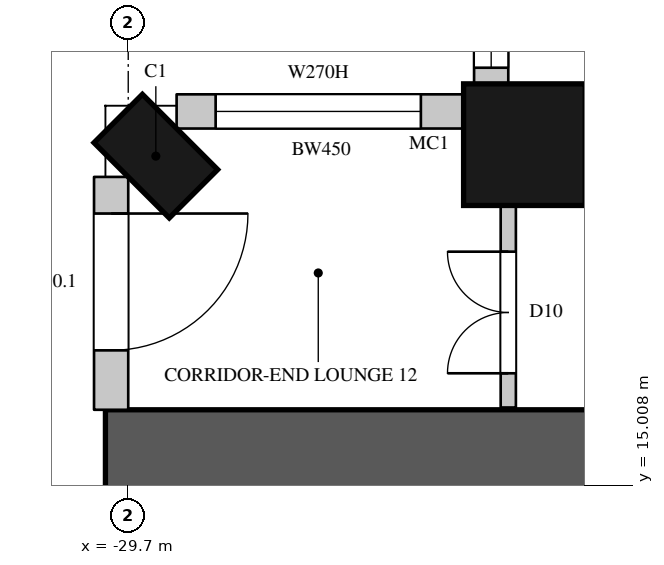
"""IFC4 building model, lengths in metres.
Left out: names, types, materials, properties, quantities, classifications, styles, units other than length and angle.
Written with IfcOpenShell. Run it as: python <this file> out.ifc"""

import sys

from ifc_helpers import new_model, si_unit, direction, frame, frame_2d, origin, origin_2d, place, context, subcontext, project, spatial, rectangle, circle, extrude, element, fill, save


model = new_model("IFC4")
c1 = context("Model", 3, precision=1e-05, world=origin(), true_north=direction((0.0, 1.0)))
c2 = subcontext(c1, "Body", "Model", "MODEL_VIEW")
j1 = project(units=[si_unit("LENGTHUNIT", "METRE"), si_unit("PLANEANGLEUNIT", "RADIAN")], contexts=[c1])
p1 = place(None, origin())
s1 = spatial("IfcSite", under=j1, at=p1, CompositionType="ELEMENT")
p2 = place(p1, origin())
s2 = spatial("IfcBuilding", under=s1, at=p2, CompositionType="ELEMENT")
p3 = place(p2, frame((0.0, 0.0, 73.5)))
s3 = spatial("IfcBuildingStorey", under=s2, at=p3, CompositionType="ELEMENT", Elevation=73.5)
p4 = place(p3, frame((-29.337, 19.337, 0.0), z_axis=(0.0, 0.0, 1.0), x_axis=(-0.707106781187, -0.707106781187, 0.0)))
e1 = element("IfcColumn", 1, at=p4, inside=s3, PredefinedType="COLUMN", context=c2, shape_type="SweptSolid", body=[
    extrude(rectangle(XDim=0.9, YDim=1.4, at=origin_2d()), origin(), (0.0, 0.0, 1.0), 3.6),
])
p5 = place(p3, frame((-24.488, 19.488, 0.0), z_axis=(0.0, 0.0, 1.0), x_axis=(1.0, 0.0, 0.0)))
e2 = element("IfcColumn", 2, at=p5, inside=s3, PredefinedType="COLUMN", context=c2, shape_type="SweptSolid", body=[
    extrude(circle(Radius=0.8, at=origin_2d()), origin(), (0.0, 0.0, 1.0), 3.6),
])
p6 = place(p3, frame((-29.925, 19.064, 0.0), z_axis=(0.0, 0.0, 1.0), x_axis=(0.0, -1.0, 0.0)))
e3 = element("IfcWall", 3, at=p6, inside=s3, PredefinedType="SOLIDWALL", context=c2, shape_type="SweptSolid", body=[
    extrude(rectangle(XDim=3.064, YDim=0.45, at=frame_2d((1.532, 0.0))), origin(), (0.0, 0.0, 1.0), 3.3),
])
p7 = place(p6, frame((0.482, 0.0, 0.0)))
e4 = element("IfcOpeningElement", 4, at=p7, cuts=e3, PredefinedType="OPENING", context=c2, shape_type="SweptSolid", body=[
    extrude(rectangle(XDim=1.8, YDim=2.4, at=frame_2d((0.9, 1.2))), frame((0.0, 0.235, 0.0), z_axis=(0.0, -1.0, 0.0), x_axis=(1.0, 0.0, 0.0)), (0.0, 0.0, 1.0), 0.47),
])
p8 = place(p3, frame((-24.925, 22.05, 0.0), z_axis=(0.0, 0.0, 1.0), x_axis=(0.0, -1.0, 0.0)))
e5 = element("IfcWall", 5, at=p8, inside=s3, PredefinedType="SOLIDWALL", context=c2, shape_type="SweptSolid", body=[
    extrude(rectangle(XDim=1.792, YDim=0.45, at=frame_2d((0.896, 0.0))), origin(), (0.0, 0.0, 1.0), 3.3),
])
p9 = place(p8, frame((0.35, 0.0, 1.05)))
e6 = element("IfcOpeningElement", 6, at=p9, cuts=e5, PredefinedType="OPENING", context=c2, shape_type="SweptSolid", body=[
    extrude(rectangle(XDim=1.2, YDim=2.0, at=frame_2d((0.6, 1.0))), frame((0.0, 0.235, 0.0), z_axis=(0.0, -1.0, 0.0), x_axis=(1.0, 0.0, 0.0)), (0.0, 0.0, 1.0), 0.47),
])
p10 = place(p3, frame((-25.259, 19.925, 0.0), z_axis=(0.0, 0.0, 1.0), x_axis=(-1.0, 0.0, 0.0)))
e7 = element("IfcWall", 7, at=p10, inside=s3, PredefinedType="SOLIDWALL", context=c2, shape_type="SweptSolid", body=[
    extrude(rectangle(XDim=3.805, YDim=0.45, at=frame_2d((1.903, 0.0))), origin(), (0.0, 0.0, 1.0), 3.3),
])
p11 = place(p10, frame((0.592, 0.0, 1.05)))
e8 = element("IfcOpeningElement", 8, at=p11, cuts=e7, PredefinedType="OPENING", context=c2, shape_type="SweptSolid", body=[
    extrude(rectangle(XDim=2.7, YDim=2.0, at=frame_2d((1.35, 1.0))), frame((0.0, 0.235, 0.0), z_axis=(0.0, -1.0, 0.0), x_axis=(1.0, 0.0, 0.0)), (0.0, 0.0, 1.0), 0.47),
])
p12 = place(p3, frame((-30.0, 15.4, 0.0), z_axis=(0.0, 0.0, 1.0), x_axis=(1.0, 0.0, 0.0)))
e9 = element("IfcWall", 9, at=p12, inside=s3, PredefinedType="SHEAR", context=c2, shape_type="SweptSolid", body=[
    extrude(rectangle(XDim=16.0, YDim=1.2, at=frame_2d((8.0, 0.0))), origin(), (0.0, 0.0, 1.0), 3.6),
])
p13 = place(p12, frame((13.4, 0.0, 0.0)))
e10 = element("IfcOpeningElement", 10, at=p13, cuts=e9, PredefinedType="OPENING", context=c2, shape_type="SweptSolid", body=[
    extrude(rectangle(XDim=1.5, YDim=2.4, at=frame_2d((0.75, 1.2))), frame((0.0, 0.61, 0.0), z_axis=(0.0, -1.0, 0.0), x_axis=(1.0, 0.0, 0.0)), (0.0, 0.0, 1.0), 1.22),
])
p14 = place(p3, frame((-24.7, 16.03, 0.0), z_axis=(0.0, 0.0, 1.0), x_axis=(0.0, 1.0, 0.0)))
e11 = element("IfcWall", 11, at=p14, inside=s3, PredefinedType="PARTITIONING", context=c2, shape_type="SweptSolid", body=[
    extrude(rectangle(XDim=2.67, YDim=0.2, at=frame_2d((1.335, 0.0))), origin(), (0.0, 0.0, 1.0), 3.3),
])
p15 = place(p14, frame((0.45, 0.0, 0.0)))
e12 = element("IfcOpeningElement", 12, at=p15, cuts=e11, PredefinedType="OPENING", context=c2, shape_type="SweptSolid", body=[
    extrude(rectangle(XDim=1.6, YDim=2.4, at=frame_2d((0.8, 1.2))), frame((0.0, 0.11, 0.0), z_axis=(0.0, -1.0, 0.0), x_axis=(1.0, 0.0, 0.0)), (0.0, 0.0, 1.0), 0.22),
])
p16 = place(p3, frame((-23.7, 19.7, 0.0), z_axis=(0.0, 0.0, 1.0), x_axis=(1.0, 0.0, 0.0)))
e13 = element("IfcWall", 13, at=p16, inside=s3, PredefinedType="PARTITIONING", context=c2, shape_type="SweptSolid", body=[
    extrude(rectangle(XDim=3.0, YDim=0.2, at=frame_2d((1.5, 0.0))), origin(), (0.0, 0.0, 1.0), 3.3),
])
p17 = place(p16, frame((0.8, 0.0, 0.0)))
e14 = element("IfcOpeningElement", 14, at=p17, cuts=e13, PredefinedType="OPENING", context=c2, shape_type="SweptSolid", body=[
    extrude(rectangle(XDim=0.9, YDim=2.2, at=frame_2d((0.45, 1.1))), frame((0.0, 0.11, 0.0), z_axis=(0.0, -1.0, 0.0), x_axis=(1.0, 0.0, 0.0)), (0.0, 0.0, 1.0), 0.22),
])
p18 = place(p7, origin())
e15 = element("IfcDoor", 15, at=p18, inside=s3, OperationType="SLIDING_TO_LEFT", PredefinedType="DOOR", context=c2, shape_type="SweptSolid", body=[
    extrude(rectangle(XDim=1.8, YDim=2.4, at=frame_2d((0.9, 1.2))), frame((0.0, 0.13, 0.0), z_axis=(0.0, -1.0, 0.0), x_axis=(1.0, 0.0, 0.0)), (0.0, 0.0, 1.0), 0.05),
])
fill(e4, e15)
p19 = place(p9, origin())
e16 = element("IfcWindow", 16, at=p19, inside=s3, PartitioningType="SINGLE_PANEL", PredefinedType="WINDOW", context=c2, shape_type="SweptSolid", body=[
    extrude(rectangle(XDim=1.2, YDim=2.0, at=frame_2d((0.6, 1.0))), frame((0.0, 0.135, 0.0), z_axis=(0.0, -1.0, 0.0), x_axis=(1.0, 0.0, 0.0)), (0.0, 0.0, 1.0), 0.06),
])
fill(e6, e16)
p20 = place(p11, origin())
e17 = element("IfcWindow", 17, at=p20, inside=s3, PartitioningType="SINGLE_PANEL", PredefinedType="WINDOW", context=c2, shape_type="SweptSolid", body=[
    extrude(rectangle(XDim=2.7, YDim=2.0, at=frame_2d((1.35, 1.0))), frame((0.0, 0.135, 0.0), z_axis=(0.0, -1.0, 0.0), x_axis=(1.0, 0.0, 0.0)), (0.0, 0.0, 1.0), 0.06),
])
fill(e8, e17)
p21 = place(p15, origin())
e18 = element("IfcDoor", 18, at=p21, inside=s3, OperationType="DOUBLE_DOOR_SINGLE_SWING", PredefinedType="DOOR", context=c2, shape_type="SweptSolid", body=[
    extrude(rectangle(XDim=1.6, YDim=2.4, at=frame_2d((0.8, 1.2))), frame((0.0, 0.025, 0.0), z_axis=(0.0, -1.0, 0.0), x_axis=(1.0, 0.0, 0.0)), (0.0, 0.0, 1.0), 0.05),
])
fill(e12, e18)
save(model, sys.argv[1])
